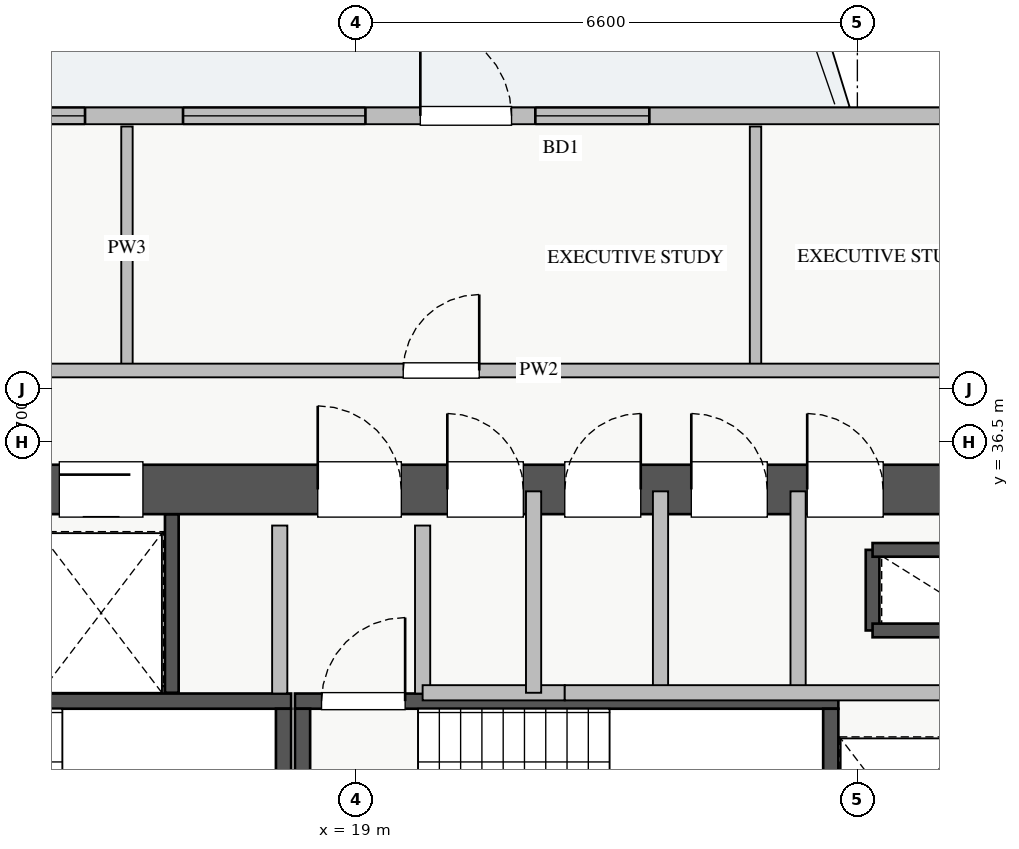
"""IFC4 building model, lengths in metres.
Left out: names, types, materials, properties, quantities, classifications, styles, units other than length and angle.
Written with IfcOpenShell. Run it as: python <this file> out.ifc"""

import sys

from ifc_helpers import new_model, si_unit, direction, frame, frame_2d, origin, place, context, subcontext, project, spatial, rectangle, extrude, source, transform, mapped, element, fill, save


model = new_model("IFC4")
c1 = context("Model", 3, precision=1e-05, world=origin(), true_north=direction((0.0, 1.0)))
c2 = subcontext(c1, "Body", "Model", "MODEL_VIEW")
j1 = project(units=[si_unit("LENGTHUNIT", "METRE"), si_unit("PLANEANGLEUNIT", "RADIAN")], contexts=[c1])
p1 = place(None, origin())
s1 = spatial("IfcSite", under=j1, at=p1, CompositionType="ELEMENT")
p2 = place(p1, origin())
s2 = spatial("IfcBuilding", under=s1, at=p2, CompositionType="ELEMENT")
p3 = place(p2, frame((0.0, 0.0, 132.75)))
s3 = spatial("IfcBuildingStorey", under=s2, at=p3, CompositionType="ELEMENT", Elevation=132.75)
p4 = place(p3, frame((25.8, 34.02, 0.0), z_axis=(0.0, 0.0, 1.0), x_axis=(0.0, 1.0, 0.0)))
e1 = element("IfcWall", 1, at=p4, inside=s3, PredefinedType="SHEAR", context=c2, shape_type="SweptSolid", body=[
    extrude(rectangle(XDim=1.06, YDim=0.18, at=frame_2d((0.53, 0.0))), origin(), (0.0, 0.0, 1.0), 3.07),
])
for number, where, z_axis, x_axis in (
    (2, (25.8, 35.08, 0.0), (0.0, 0.0, 1.0), (1.0, 0.0, 0.0)),
    (3, (25.8, 34.02, 0.0), (0.0, 0.0, 1.0), (1.0, 0.0, 0.0)),
):
    element("IfcWall", number, at=place(p3, frame(where, z_axis=z_axis, x_axis=x_axis)), inside=s3, PredefinedType="SHEAR", context=c2, shape_type="SweptSolid", body=[
        extrude(rectangle(XDim=1.35, YDim=0.18, at=frame_2d((0.675, 0.0))), origin(), (0.0, 0.0, 1.0), 3.07),
    ])
p5 = place(p3, frame((14.62, 33.2, 0.0), z_axis=(0.0, 0.0, 1.0), x_axis=(1.0, 0.0, 0.0)))
e4 = element("IfcWall", 4, at=p5, inside=s3, PredefinedType="SHEAR", context=c2, shape_type="SweptSolid", body=[
    extrude(rectangle(XDim=1.96, YDim=0.18, at=frame_2d((0.98, 0.0))), origin(), (0.0, 0.0, 1.0), 3.07),
])
p6 = place(p3, frame((16.58, 33.2, 0.0), z_axis=(0.0, 0.0, 1.0), x_axis=(0.0, 1.0, 0.0)))
e5 = element("IfcWall", 5, at=p6, inside=s3, PredefinedType="SHEAR", context=c2, shape_type="SweptSolid", body=[
    extrude(rectangle(XDim=2.35, YDim=0.18, at=frame_2d((1.175, 0.0))), origin(), (0.0, 0.0, 1.0), 3.07),
])
p7 = place(p3, frame((10.85, 33.09, 0.0), z_axis=(0.0, 0.0, 1.0), x_axis=(1.0, 0.0, 0.0)))
e6 = element("IfcWall", 6, at=p7, inside=s3, PredefinedType="SHEAR", context=c2, shape_type="SweptSolid", body=[
    extrude(rectangle(XDim=7.3, YDim=0.2, at=frame_2d((3.65, 0.0))), origin(), (0.0, 0.0, 1.0), 3.25),
])
p8 = place(p7, frame((0.35, 0.0, 0.0)))
e7 = element("IfcOpeningElement", 7, at=p8, cuts=e6, PredefinedType="OPENING", context=c2, shape_type="SweptSolid", body=[
    extrude(rectangle(XDim=1.1, YDim=2.05, at=frame_2d((0.55, 1.025))), frame((0.0, 0.11, 0.0), z_axis=(0.0, -1.0, 0.0), x_axis=(1.0, 0.0, 0.0)), (0.0, 0.0, 1.0), 0.22),
])
p9 = place(p3, frame((18.05, 30.05, 0.0), z_axis=(0.0, 0.0, 1.0), x_axis=(0.0, 1.0, 0.0)))
e8 = element("IfcWall", 8, at=p9, inside=s3, PredefinedType="SHEAR", context=c2, shape_type="SweptSolid", body=[
    extrude(rectangle(XDim=2.94, YDim=0.2, at=frame_2d((1.47, 0.0))), origin(), (0.0, 0.0, 1.0), 3.25),
])
p10 = place(p3, frame((18.2, 33.09, 0.0), z_axis=(0.0, 0.0, 1.0), x_axis=(1.0, 0.0, 0.0)))
e9 = element("IfcWall", 9, at=p10, inside=s3, PredefinedType="SHEAR", context=c2, shape_type="SweptSolid", body=[
    extrude(rectangle(XDim=7.15, YDim=0.2, at=frame_2d((3.575, 0.0))), origin(), (0.0, 0.0, 1.0), 3.25),
])
p11 = place(p10, frame((0.35, 0.0, 0.0)))
e10 = element("IfcOpeningElement", 10, at=p11, cuts=e9, PredefinedType="OPENING", context=c2, shape_type="SweptSolid", body=[
    extrude(rectangle(XDim=1.1, YDim=2.05, at=frame_2d((0.55, 1.025))), frame((0.0, 0.11, 0.0), z_axis=(0.0, -1.0, 0.0), x_axis=(1.0, 0.0, 0.0)), (0.0, 0.0, 1.0), 0.22),
])
for number, where, z_axis, x_axis in (
    (11, (18.3, 30.05, 0.0), (0.0, 0.0, 1.0), (0.0, 1.0, 0.0)),
    (12, (25.25, 30.05, 0.0), (0.0, 0.0, 1.0), (0.0, 1.0, 0.0)),
):
    element("IfcWall", number, at=place(p3, frame(where, z_axis=z_axis, x_axis=x_axis)), inside=s3, PredefinedType="SHEAR", context=c2, shape_type="SweptSolid", body=[
        extrude(rectangle(XDim=2.94, YDim=0.2, at=frame_2d((1.47, 0.0))), origin(), (0.0, 0.0, 1.0), 3.25),
    ])
p12 = place(p3, frame((10.2, 35.875, 0.0), z_axis=(0.0, 0.0, 1.0), x_axis=(1.0, 0.0, 0.0)))
e13 = element("IfcWall", 13, at=p12, inside=s3, PredefinedType="SHEAR", context=c2, shape_type="SweptSolid", body=[
    extrude(rectangle(XDim=17.6, YDim=0.65, at=frame_2d((8.8, 0.0))), origin(), (0.0, 0.0, 1.0), 3.25),
])
p13 = place(p12, frame((1.15, 0.0, 0.0)))
e14 = element("IfcOpeningElement", 14, at=p13, cuts=e13, PredefinedType="OPENING", context=c2, shape_type="SweptSolid", body=[
    extrude(rectangle(XDim=1.1, YDim=2.05, at=frame_2d((0.55, 1.025))), frame((0.0, 0.335, 0.0), z_axis=(0.0, -1.0, 0.0), x_axis=(1.0, 0.0, 0.0)), (0.0, 0.0, 1.0), 0.67),
])
p14 = place(p12, frame((8.3, 0.0, 0.0)))
e15 = element("IfcOpeningElement", 15, at=p14, cuts=e13, PredefinedType="OPENING", context=c2, shape_type="SweptSolid", body=[
    extrude(rectangle(XDim=1.1, YDim=2.05, at=frame_2d((0.55, 1.025))), frame((0.0, 0.335, 0.0), z_axis=(0.0, -1.0, 0.0), x_axis=(1.0, 0.0, 0.0)), (0.0, 0.0, 1.0), 0.67),
])
p15 = place(p12, frame((4.9, 0.0, 0.0)))
e16 = element("IfcOpeningElement", 16, at=p15, cuts=e13, PredefinedType="OPENING", context=c2, shape_type="SweptSolid", body=[
    extrude(rectangle(XDim=1.1, YDim=2.05, at=frame_2d((0.55, 1.025))), frame((0.0, 0.335, 0.0), z_axis=(0.0, -1.0, 0.0), x_axis=(1.0, 0.0, 0.0)), (0.0, 0.0, 1.0), 0.67),
])
p16 = place(p12, frame((14.74, 0.0, 0.0)))
e17 = element("IfcOpeningElement", 17, at=p16, cuts=e13, PredefinedType="OPENING", context=c2, shape_type="SweptSolid", body=[
    extrude(rectangle(XDim=1.0, YDim=2.05, at=frame_2d((0.5, 1.025))), frame((0.0, 0.335, 0.0), z_axis=(0.0, -1.0, 0.0), x_axis=(1.0, 0.0, 0.0)), (0.0, 0.0, 1.0), 0.67),
])
p17 = place(p12, frame((10.005, 0.0, 0.0)))
e18 = element("IfcOpeningElement", 18, at=p17, cuts=e13, PredefinedType="OPENING", context=c2, shape_type="SweptSolid", body=[
    extrude(rectangle(XDim=1.0, YDim=2.05, at=frame_2d((0.5, 1.025))), frame((0.0, 0.335, 0.0), z_axis=(0.0, -1.0, 0.0), x_axis=(1.0, 0.0, 0.0)), (0.0, 0.0, 1.0), 0.67),
])
p18 = place(p12, frame((11.55, 0.0, 0.0)))
e19 = element("IfcOpeningElement", 19, at=p18, cuts=e13, PredefinedType="OPENING", context=c2, shape_type="SweptSolid", body=[
    extrude(rectangle(XDim=1.0, YDim=2.05, at=frame_2d((0.5, 1.025))), frame((0.0, 0.335, 0.0), z_axis=(0.0, -1.0, 0.0), x_axis=(1.0, 0.0, 0.0)), (0.0, 0.0, 1.0), 0.67),
])
p19 = place(p12, frame((13.215, 0.0, 0.0)))
e20 = element("IfcOpeningElement", 20, at=p19, cuts=e13, PredefinedType="OPENING", context=c2, shape_type="SweptSolid", body=[
    extrude(rectangle(XDim=1.0, YDim=2.05, at=frame_2d((0.5, 1.025))), frame((0.0, 0.335, 0.0), z_axis=(0.0, -1.0, 0.0), x_axis=(1.0, 0.0, 0.0)), (0.0, 0.0, 1.0), 0.67),
])
p20 = place(p3, frame((6.55, 40.79, 0.0), z_axis=(0.0, 0.0, 1.0), x_axis=(1.0, 0.0, 0.0)))
e21 = element("IfcWall", 21, at=p20, inside=s3, PredefinedType="STANDARD", context=c2, shape_type="SweptSolid", body=[
    extrude(rectangle(XDim=24.9, YDim=0.22, at=frame_2d((12.45, 0.0))), origin(), (0.0, 0.0, 1.0), 2.61),
])
p21 = place(p20, frame((13.3, 0.0, 0.0)))
e22 = element("IfcOpeningElement", 22, at=p21, cuts=e21, PredefinedType="OPENING", context=c2, shape_type="SweptSolid", body=[
    extrude(rectangle(XDim=1.2, YDim=2.1, at=frame_2d((0.6, 1.05))), frame((0.0, 0.12, 0.0), z_axis=(0.0, -1.0, 0.0), x_axis=(1.0, 0.0, 0.0)), (0.0, 0.0, 1.0), 0.24),
])
p22 = place(p20, frame((0.393, 0.0, 0.9)))
e23 = element("IfcOpeningElement", 23, at=p22, cuts=e21, PredefinedType="OPENING", context=c2, shape_type="SweptSolid", body=[
    extrude(rectangle(XDim=1.5, YDim=1.5, at=frame_2d((0.75, 0.75))), frame((0.0, 0.12, 0.0), z_axis=(0.0, -1.0, 0.0), x_axis=(1.0, 0.0, 0.0)), (0.0, 0.0, 1.0), 0.24),
])
p23 = place(p20, frame((7.088, 0.0, 0.9)))
e24 = element("IfcOpeningElement", 24, at=p23, cuts=e21, PredefinedType="OPENING", context=c2, shape_type="SweptSolid", body=[
    extrude(rectangle(XDim=1.8, YDim=1.5, at=frame_2d((0.9, 0.75))), frame((0.0, 0.12, 0.0), z_axis=(0.0, -1.0, 0.0), x_axis=(1.0, 0.0, 0.0)), (0.0, 0.0, 1.0), 0.24),
])
p24 = place(p20, frame((14.813, 0.0, 0.9)))
e25 = element("IfcOpeningElement", 25, at=p24, cuts=e21, PredefinedType="OPENING", context=c2, shape_type="SweptSolid", body=[
    extrude(rectangle(XDim=1.5, YDim=1.45, at=frame_2d((0.75, 0.725))), frame((0.0, 0.12, 0.0), z_axis=(0.0, -1.0, 0.0), x_axis=(1.0, 0.0, 0.0)), (0.0, 0.0, 1.0), 0.24),
])
p25 = place(p20, frame((20.738, 0.0, 0.9)))
e26 = element("IfcOpeningElement", 26, at=p25, cuts=e21, PredefinedType="OPENING", context=c2, shape_type="SweptSolid", body=[
    extrude(rectangle(XDim=2.1, YDim=1.48, at=frame_2d((1.05, 0.74))), frame((0.0, 0.12, 0.0), z_axis=(0.0, -1.0, 0.0), x_axis=(1.0, 0.0, 0.0)), (0.0, 0.0, 1.0), 0.24),
])
p26 = place(p20, frame((4.171, 0.0, 0.9)))
e27 = element("IfcOpeningElement", 27, at=p26, cuts=e21, PredefinedType="OPENING", context=c2, shape_type="SweptSolid", body=[
    extrude(rectangle(XDim=2.4, YDim=1.5, at=frame_2d((1.2, 0.75))), frame((0.0, 0.12, 0.0), z_axis=(0.0, -1.0, 0.0), x_axis=(1.0, 0.0, 0.0)), (0.0, 0.0, 1.0), 0.24),
])
p27 = place(p20, frame((10.177, 0.0, 0.9)))
e28 = element("IfcOpeningElement", 28, at=p27, cuts=e21, PredefinedType="OPENING", context=c2, shape_type="SweptSolid", body=[
    extrude(rectangle(XDim=2.4, YDim=1.5, at=frame_2d((1.2, 0.75))), frame((0.0, 0.12, 0.0), z_axis=(0.0, -1.0, 0.0), x_axis=(1.0, 0.0, 0.0)), (0.0, 0.0, 1.0), 0.24),
])
for number, where, z_axis, x_axis in (
    (29, (18.0, 33.19, 0.0), (0.0, 0.0, 1.0), (0.0, 1.0, 0.0)),
    (30, (19.88, 33.19, 0.0), (0.0, 0.0, 1.0), (0.0, 1.0, 0.0)),
):
    element("IfcWall", number, at=place(p3, frame(where, z_axis=z_axis, x_axis=x_axis)), inside=s3, PredefinedType="PARTITIONING", context=c2, shape_type="SweptSolid", body=[
        extrude(rectangle(XDim=2.21, YDim=0.2, at=frame_2d((1.105, 0.0))), origin(), (0.0, 0.0, 1.0), 3.07),
    ])
p28 = place(p3, frame((24.82, 33.2, 0.0), z_axis=(0.0, 0.0, 1.0), x_axis=(0.0, 1.0, 0.0)))
e31 = element("IfcWall", 31, at=p28, inside=s3, PredefinedType="PARTITIONING", context=c2, shape_type="SweptSolid", body=[
    extrude(rectangle(XDim=2.65, YDim=0.2, at=frame_2d((1.325, 0.0))), origin(), (0.0, 0.0, 1.0), 3.07),
])
p29 = place(p3, frame((19.88, 33.2, 0.0), z_axis=(0.0, 0.0, 1.0), x_axis=(1.0, 0.0, 0.0)))
e32 = element("IfcWall", 32, at=p29, inside=s3, PredefinedType="PARTITIONING", context=c2, shape_type="SweptSolid", body=[
    extrude(rectangle(XDim=1.87, YDim=0.2, at=frame_2d((0.935, 0.0))), origin(), (0.0, 0.0, 1.0), 3.07),
])
for number, where, z_axis, x_axis in (
    (33, (21.34, 33.2, 0.0), (0.0, 0.0, 1.0), (0.0, 1.0, 0.0)),
    (34, (23.01, 33.2, 0.0), (0.0, 0.0, 1.0), (0.0, 1.0, 0.0)),
):
    element("IfcWall", number, at=place(p3, frame(where, z_axis=z_axis, x_axis=x_axis)), inside=s3, PredefinedType="PARTITIONING", context=c2, shape_type="SweptSolid", body=[
        extrude(rectangle(XDim=2.65, YDim=0.2, at=frame_2d((1.325, 0.0))), origin(), (0.0, 0.0, 1.0), 3.07),
    ])
p30 = place(p3, frame((21.75, 33.2, 0.0), z_axis=(0.0, 0.0, 1.0), x_axis=(1.0, 0.0, 0.0)))
e35 = element("IfcWall", 35, at=p30, inside=s3, PredefinedType="PARTITIONING", context=c2, shape_type="SweptSolid", body=[
    extrude(rectangle(XDim=5.17, YDim=0.2, at=frame_2d((2.585, 0.0))), origin(), (0.0, 0.0, 1.0), 3.07),
])
p31 = place(p3, frame((15.99, 37.44, 0.0), z_axis=(0.0, 0.0, 1.0), x_axis=(0.0, 1.0, 0.0)))
e36 = element("IfcWall", 36, at=p31, inside=s3, PredefinedType="PARTITIONING", context=c2, shape_type="SweptSolid", body=[
    extrude(rectangle(XDim=3.21, YDim=0.15, at=frame_2d((1.605, 0.0))), origin(), (0.0, 0.0, 1.0), 2.771),
])
p32 = place(p3, frame((24.26, 37.44, 0.0), z_axis=(0.0, 0.0, 1.0), x_axis=(0.0, 1.0, 0.0)))
e37 = element("IfcWall", 37, at=p32, inside=s3, PredefinedType="PARTITIONING", context=c2, shape_type="SweptSolid", body=[
    extrude(rectangle(XDim=3.21, YDim=0.15, at=frame_2d((1.605, 0.0))), origin(), (0.0, 0.0, 1.0), 3.07),
])
p33 = place(p3, frame((8.82, 37.44, 0.0), z_axis=(0.0, 0.0, 1.0), x_axis=(1.0, 0.0, 0.0)))
e38 = element("IfcWall", 38, at=p33, inside=s3, PredefinedType="PARTITIONING", context=c2, shape_type="SweptSolid", body=[
    extrude(rectangle(XDim=23.58, YDim=0.18, at=frame_2d((11.79, 0.0))), origin(), (0.0, 0.0, 1.0), 3.07),
])
p34 = place(p33, frame((3.085, 0.0, 0.0)))
e39 = element("IfcOpeningElement", 39, at=p34, cuts=e38, PredefinedType="OPENING", context=c2, shape_type="SweptSolid", body=[
    extrude(rectangle(XDim=1.0, YDim=2.05, at=frame_2d((0.5, 1.025))), frame((0.0, 0.1, 0.0), z_axis=(0.0, -1.0, 0.0), x_axis=(1.0, 0.0, 0.0)), (0.0, 0.0, 1.0), 0.2),
])
p35 = place(p33, frame((10.805, 0.0, 0.0)))
e40 = element("IfcOpeningElement", 40, at=p35, cuts=e38, PredefinedType="OPENING", context=c2, shape_type="SweptSolid", body=[
    extrude(rectangle(XDim=1.0, YDim=2.05, at=frame_2d((0.5, 1.025))), frame((0.0, 0.1, 0.0), z_axis=(0.0, -1.0, 0.0), x_axis=(1.0, 0.0, 0.0)), (0.0, 0.0, 1.0), 0.2),
])
p36 = place(p33, frame((18.8, 0.0, 0.0)))
e41 = element("IfcOpeningElement", 41, at=p36, cuts=e38, PredefinedType="OPENING", context=c2, shape_type="SweptSolid", body=[
    extrude(rectangle(XDim=1.0, YDim=2.05, at=frame_2d((0.5, 1.025))), frame((0.0, 0.1, 0.0), z_axis=(0.0, -1.0, 0.0), x_axis=(1.0, 0.0, 0.0)), (0.0, 0.0, 1.0), 0.2),
])
m1 = source(origin(), c2, "Body", "SweptSolid", [
    extrude(rectangle(XDim=1.2, YDim=2.1, at=frame_2d((0.6, 1.05))), frame((0.0, 0.025, 0.0), z_axis=(0.0, -1.0, 0.0), x_axis=(1.0, 0.0, 0.0)), (0.0, 0.0, 1.0), 0.05),
])
p37 = place(p21, origin())
e42 = element("IfcDoor", 42, at=p37, inside=s3, OperationType="SINGLE_SWING_LEFT", PredefinedType="DOOR", context=c2, shape_type="MappedRepresentation", body=[
    mapped(m1, transform((0.0, 0.0, 0.0), x_axis=(1.0, 0.0, 0.0), y_axis=(0.0, 1.0, 0.0), z_axis=(0.0, 0.0, 1.0), scale=1.0)),
])
fill(e22, e42)
m2 = source(origin(), c2, "Body", "SweptSolid", [
    extrude(rectangle(XDim=1.8, YDim=1.5, at=frame_2d((0.9, 0.75))), frame((0.0, 0.03, 0.0), z_axis=(0.0, -1.0, 0.0), x_axis=(1.0, 0.0, 0.0)), (0.0, 0.0, 1.0), 0.06),
])
p38 = place(p23, origin())
e43 = element("IfcWindow", 43, at=p38, inside=s3, PartitioningType="DOUBLE_PANEL_VERTICAL", PredefinedType="WINDOW", context=c2, shape_type="MappedRepresentation", body=[
    mapped(m2, transform((0.0, 0.0, 0.0), x_axis=(1.0, 0.0, 0.0), y_axis=(0.0, 1.0, 0.0), z_axis=(0.0, 0.0, 1.0), scale=1.0)),
])
fill(e24, e43)
m3 = source(origin(), c2, "Body", "SweptSolid", [
    extrude(rectangle(XDim=1.5, YDim=1.45, at=frame_2d((0.75, 0.725))), frame((0.0, 0.03, 0.0), z_axis=(0.0, -1.0, 0.0), x_axis=(1.0, 0.0, 0.0)), (0.0, 0.0, 1.0), 0.06),
])
p39 = place(p24, origin())
e44 = element("IfcWindow", 44, at=p39, inside=s3, PartitioningType="DOUBLE_PANEL_VERTICAL", PredefinedType="WINDOW", context=c2, shape_type="MappedRepresentation", body=[
    mapped(m3, transform((0.0, 0.0, 0.0), x_axis=(1.0, 0.0, 0.0), y_axis=(0.0, 1.0, 0.0), z_axis=(0.0, 0.0, 1.0), scale=1.0)),
])
fill(e25, e44)
m4 = source(origin(), c2, "Body", "SweptSolid", [
    extrude(rectangle(XDim=1.1, YDim=2.05, at=frame_2d((0.55, 1.025))), frame((0.0, 0.025, 0.0), z_axis=(0.0, -1.0, 0.0), x_axis=(1.0, 0.0, 0.0)), (0.0, 0.0, 1.0), 0.05),
])
p40 = place(p14, origin())
e45 = element("IfcDoor", 45, at=p40, inside=s3, OperationType="SINGLE_SWING_LEFT", PredefinedType="DOOR", context=c2, shape_type="MappedRepresentation", body=[
    mapped(m4, transform((0.0, 0.0, 0.0), x_axis=(1.0, 0.0, 0.0), y_axis=(0.0, 1.0, 0.0), z_axis=(0.0, 0.0, 1.0), scale=1.0)),
])
fill(e15, e45)
p41 = place(p11, origin())
e46 = element("IfcDoor", 46, at=p41, inside=s3, OperationType="SINGLE_SWING_RIGHT", PredefinedType="DOOR", context=c2, shape_type="MappedRepresentation", body=[
    mapped(m4, transform((0.0, 0.0, 0.0), x_axis=(1.0, 0.0, 0.0), y_axis=(0.0, 1.0, 0.0), z_axis=(0.0, 0.0, 1.0), scale=1.0)),
])
fill(e10, e46)
p42 = place(p15, origin())
e47 = element("IfcDoor", 47, at=p42, inside=s3, OperationType="SLIDING_TO_LEFT", PredefinedType="DOOR", context=c2, shape_type="MappedRepresentation", body=[
    mapped(m4, transform((0.0, 0.0, 0.0), x_axis=(1.0, 0.0, 0.0), y_axis=(0.0, 1.0, 0.0), z_axis=(0.0, 0.0, 1.0), scale=1.0)),
])
fill(e16, e47)
m5 = source(origin(), c2, "Body", "SweptSolid", [
    extrude(rectangle(XDim=1.0, YDim=2.05, at=frame_2d((0.5, 1.025))), frame((0.0, 0.025, 0.0), z_axis=(0.0, -1.0, 0.0), x_axis=(1.0, 0.0, 0.0)), (0.0, 0.0, 1.0), 0.05),
])
p43 = place(p16, origin())
e48 = element("IfcDoor", 48, at=p43, inside=s3, OperationType="SINGLE_SWING_LEFT", PredefinedType="DOOR", context=c2, shape_type="MappedRepresentation", body=[
    mapped(m5, transform((0.0, 0.0, 0.0), x_axis=(1.0, 0.0, 0.0), y_axis=(0.0, 1.0, 0.0), z_axis=(0.0, 0.0, 1.0), scale=1.0)),
])
fill(e17, e48)
p44 = place(p17, origin())
e49 = element("IfcDoor", 49, at=p44, inside=s3, OperationType="SINGLE_SWING_LEFT", PredefinedType="DOOR", context=c2, shape_type="MappedRepresentation", body=[
    mapped(m5, transform((0.0, 0.0, 0.0), x_axis=(1.0, 0.0, 0.0), y_axis=(0.0, 1.0, 0.0), z_axis=(0.0, 0.0, 1.0), scale=1.0)),
])
fill(e18, e49)
p45 = place(p18, origin())
e50 = element("IfcDoor", 50, at=p45, inside=s3, OperationType="SINGLE_SWING_RIGHT", PredefinedType="DOOR", context=c2, shape_type="MappedRepresentation", body=[
    mapped(m5, transform((0.0, 0.0, 0.0), x_axis=(1.0, 0.0, 0.0), y_axis=(0.0, 1.0, 0.0), z_axis=(0.0, 0.0, 1.0), scale=1.0)),
])
fill(e19, e50)
p46 = place(p19, origin())
e51 = element("IfcDoor", 51, at=p46, inside=s3, OperationType="SINGLE_SWING_LEFT", PredefinedType="DOOR", context=c2, shape_type="MappedRepresentation", body=[
    mapped(m5, transform((0.0, 0.0, 0.0), x_axis=(1.0, 0.0, 0.0), y_axis=(0.0, 1.0, 0.0), z_axis=(0.0, 0.0, 1.0), scale=1.0)),
])
fill(e20, e51)
p47 = place(p35, origin())
e52 = element("IfcDoor", 52, at=p47, inside=s3, OperationType="SINGLE_SWING_RIGHT", PredefinedType="DOOR", context=c2, shape_type="MappedRepresentation", body=[
    mapped(m5, transform((0.0, 0.0, 0.0), x_axis=(1.0, 0.0, 0.0), y_axis=(0.0, 1.0, 0.0), z_axis=(0.0, 0.0, 1.0), scale=1.0)),
])
fill(e40, e52)
m6 = source(origin(), c2, "Body", "SweptSolid", [
    extrude(rectangle(XDim=2.4, YDim=1.5, at=frame_2d((1.2, 0.75))), frame((0.0, 0.03, 0.0), z_axis=(0.0, -1.0, 0.0), x_axis=(1.0, 0.0, 0.0)), (0.0, 0.0, 1.0), 0.06),
])
p48 = place(p27, origin())
e53 = element("IfcWindow", 53, at=p48, inside=s3, PartitioningType="TRIPLE_PANEL_VERTICAL", PredefinedType="WINDOW", context=c2, shape_type="MappedRepresentation", body=[
    mapped(m6, transform((0.0, 0.0, 0.0), x_axis=(1.0, 0.0, 0.0), y_axis=(0.0, 1.0, 0.0), z_axis=(0.0, 0.0, 1.0), scale=1.0)),
])
fill(e28, e53)
save(model, sys.argv[1])
